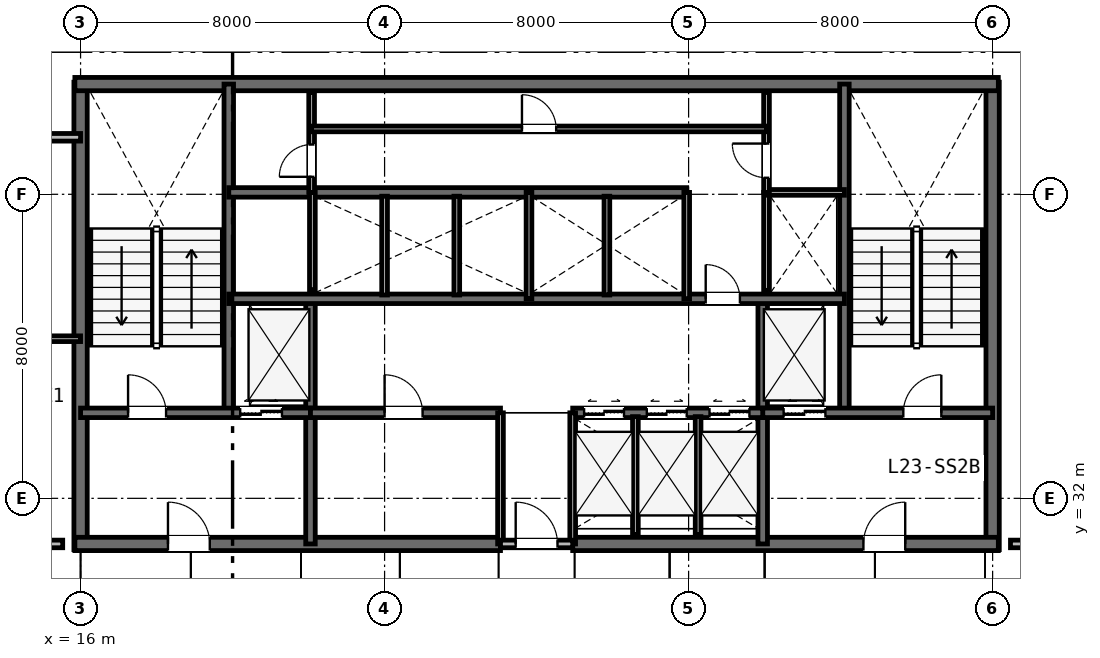
"""IFC4 building model, lengths in metres.
Left out: names, types, materials, properties, quantities, classifications, styles, units other than length and angle.
Written with IfcOpenShell. Run it as: python <this file> out.ifc"""

import sys

from ifc_helpers import new_model, si_unit, direction, frame, frame_2d, origin, place, context, subcontext, project, spatial, rectangle, extrude, element, fill, save


model = new_model("IFC4")
c1 = context("Model", 3, precision=1e-05, world=origin(), true_north=direction((0.0, 1.0)))
c2 = subcontext(c1, "Body", "Model", "MODEL_VIEW")
j1 = project(units=[si_unit("LENGTHUNIT", "METRE"), si_unit("PLANEANGLEUNIT", "RADIAN")], contexts=[c1])
p1 = place(None, origin())
s1 = spatial("IfcSite", under=j1, at=p1, CompositionType="ELEMENT")
p2 = place(p1, origin())
s2 = spatial("IfcBuilding", under=s1, at=p2, CompositionType="ELEMENT")
p3 = place(p2, frame((0.0, 0.0, 93.6)))
s3 = spatial("IfcBuildingStorey", under=s2, at=p3, CompositionType="ELEMENT", Elevation=93.6)
for number, where, z_axis, x_axis in (
    (1, (16.0, 30.65, 0.0), (0.0, 0.0, 1.0), (0.0, 1.0, 0.0)),
    (2, (40.0, 30.65, 0.0), (0.0, 0.0, 1.0), (0.0, 1.0, 0.0)),
):
    element("IfcWall", number, at=place(p3, frame(where, z_axis=z_axis, x_axis=x_axis)), inside=s3, PredefinedType="SHEAR", context=c2, shape_type="SweptSolid", body=[
        extrude(rectangle(XDim=12.3, YDim=0.35, at=frame_2d((6.15, 0.0))), origin(), (0.0, 0.0, 1.0), 3.6),
    ])
p4 = place(p3, frame((15.85, 42.9, 0.0), z_axis=(0.0, 0.0, 1.0), x_axis=(1.0, 0.0, 0.0)))
e3 = element("IfcWall", 3, at=p4, inside=s3, PredefinedType="SHEAR", context=c2, shape_type="SweptSolid", body=[
    extrude(rectangle(XDim=24.3, YDim=0.35, at=frame_2d((12.15, 0.0))), origin(), (0.0, 0.0, 1.0), 3.6),
])
p5 = place(p3, frame((15.85, 30.8, 0.0), z_axis=(0.0, 0.0, 1.0), x_axis=(1.0, 0.0, 0.0)))
e4 = element("IfcWall", 4, at=p5, inside=s3, PredefinedType="SHEAR", context=c2, shape_type="SweptSolid", body=[
    extrude(rectangle(XDim=11.2, YDim=0.35, at=frame_2d((5.6, 0.0))), origin(), (0.0, 0.0, 1.0), 3.6),
])
p6 = place(p5, frame((2.45, 0.0, 0.0)))
e5 = element("IfcOpeningElement", 5, at=p6, cuts=e4, PredefinedType="OPENING", context=c2, shape_type="SweptSolid", body=[
    extrude(rectangle(XDim=1.1, YDim=2.15, at=frame_2d((0.55, 1.075))), frame((0.0, 0.185, 0.0), z_axis=(0.0, -1.0, 0.0), x_axis=(1.0, 0.0, 0.0)), (0.0, 0.0, 1.0), 0.37),
])
p7 = place(p3, frame((28.95, 30.8, 0.0), z_axis=(0.0, 0.0, 1.0), x_axis=(1.0, 0.0, 0.0)))
e6 = element("IfcWall", 6, at=p7, inside=s3, PredefinedType="SHEAR", context=c2, shape_type="SweptSolid", body=[
    extrude(rectangle(XDim=11.2, YDim=0.35, at=frame_2d((5.6, 0.0))), origin(), (0.0, 0.0, 1.0), 3.6),
])
p8 = place(p7, frame((7.65, 0.0, 0.0)))
e7 = element("IfcOpeningElement", 7, at=p8, cuts=e6, PredefinedType="OPENING", context=c2, shape_type="SweptSolid", body=[
    extrude(rectangle(XDim=1.1, YDim=2.15, at=frame_2d((0.55, 1.075))), frame((0.0, 0.185, 0.0), z_axis=(0.0, -1.0, 0.0), x_axis=(1.0, 0.0, 0.0)), (0.0, 0.0, 1.0), 0.37),
])
for number, where, z_axis, x_axis in (
    (8, (19.9, 34.25, 0.0), (0.0, 0.0, 1.0), (0.0, 1.0, 0.0)),
    (9, (36.1, 34.25, 0.0), (0.0, 0.0, 1.0), (0.0, 1.0, 0.0)),
):
    element("IfcWall", number, at=place(p3, frame(where, z_axis=z_axis, x_axis=x_axis)), inside=s3, PredefinedType="SHEAR", context=c2, shape_type="SweptSolid", body=[
        extrude(rectangle(XDim=8.65, YDim=0.25, at=frame_2d((4.325, 0.0))), origin(), (0.0, 0.0, 1.0), 3.6),
    ])
for number, where, z_axis, x_axis in (
    (10, (22.05, 30.8, 0.0), (0.0, 0.0, 1.0), (0.0, 1.0, 0.0)),
    (11, (33.95, 30.8, 0.0), (0.0, 0.0, 1.0), (0.0, 1.0, 0.0)),
):
    element("IfcWall", number, at=place(p3, frame(where, z_axis=z_axis, x_axis=x_axis)), inside=s3, PredefinedType="SHEAR", context=c2, shape_type="SweptSolid", body=[
        extrude(rectangle(XDim=6.45, YDim=0.25, at=frame_2d((3.225, 0.0))), origin(), (0.0, 0.0, 1.0), 3.6),
    ])
p9 = place(p3, frame((16.0, 34.25, 0.0), z_axis=(0.0, 0.0, 1.0), x_axis=(1.0, 0.0, 0.0)))
e12 = element("IfcWall", 12, at=p9, inside=s3, PredefinedType="SHEAR", context=c2, shape_type="SweptSolid", body=[
    extrude(rectangle(XDim=6.05, YDim=0.25, at=frame_2d((3.025, 0.0))), origin(), (0.0, 0.0, 1.0), 3.6),
])
p10 = place(p9, frame((1.25, 0.0, 0.0)))
e13 = element("IfcOpeningElement", 13, at=p10, cuts=e12, PredefinedType="OPENING", context=c2, shape_type="SweptSolid", body=[
    extrude(rectangle(XDim=1.0, YDim=2.15, at=frame_2d((0.5, 1.075))), frame((0.0, 0.135, 0.0), z_axis=(0.0, -1.0, 0.0), x_axis=(1.0, 0.0, 0.0)), (0.0, 0.0, 1.0), 0.27),
])
p11 = place(p9, frame((4.2, 0.0, 0.0)))
e14 = element("IfcOpeningElement", 14, at=p11, cuts=e12, PredefinedType="OPENING", context=c2, shape_type="SweptSolid", body=[
    extrude(rectangle(XDim=1.1, YDim=2.15, at=frame_2d((0.55, 1.075))), frame((0.0, 0.135, 0.0), z_axis=(0.0, -1.0, 0.0), x_axis=(1.0, 0.0, 0.0)), (0.0, 0.0, 1.0), 0.27),
])
p12 = place(p3, frame((33.95, 34.25, 0.0), z_axis=(0.0, 0.0, 1.0), x_axis=(1.0, 0.0, 0.0)))
e15 = element("IfcWall", 15, at=p12, inside=s3, PredefinedType="SHEAR", context=c2, shape_type="SweptSolid", body=[
    extrude(rectangle(XDim=6.05, YDim=0.25, at=frame_2d((3.025, 0.0))), origin(), (0.0, 0.0, 1.0), 3.6),
])
p13 = place(p12, frame((3.7, 0.0, 0.0)))
e16 = element("IfcOpeningElement", 16, at=p13, cuts=e15, PredefinedType="OPENING", context=c2, shape_type="SweptSolid", body=[
    extrude(rectangle(XDim=1.0, YDim=2.15, at=frame_2d((0.5, 1.075))), frame((0.0, 0.135, 0.0), z_axis=(0.0, -1.0, 0.0), x_axis=(1.0, 0.0, 0.0)), (0.0, 0.0, 1.0), 0.27),
])
p14 = place(p12, frame((0.55, 0.0, 0.0)))
e17 = element("IfcOpeningElement", 17, at=p14, cuts=e15, PredefinedType="OPENING", context=c2, shape_type="SweptSolid", body=[
    extrude(rectangle(XDim=1.1, YDim=2.15, at=frame_2d((0.55, 1.075))), frame((0.0, 0.135, 0.0), z_axis=(0.0, -1.0, 0.0), x_axis=(1.0, 0.0, 0.0)), (0.0, 0.0, 1.0), 0.27),
])
p15 = place(p3, frame((22.05, 34.25, 0.0), z_axis=(0.0, 0.0, 1.0), x_axis=(1.0, 0.0, 0.0)))
e18 = element("IfcWall", 18, at=p15, inside=s3, PredefinedType="SHEAR", context=c2, shape_type="SweptSolid", body=[
    extrude(rectangle(XDim=5.0, YDim=0.25, at=frame_2d((2.5, 0.0))), origin(), (0.0, 0.0, 1.0), 3.6),
])
p16 = place(p15, frame((1.95, 0.0, 0.0)))
e19 = element("IfcOpeningElement", 19, at=p16, cuts=e18, PredefinedType="OPENING", context=c2, shape_type="SweptSolid", body=[
    extrude(rectangle(XDim=1.0, YDim=2.15, at=frame_2d((0.5, 1.075))), frame((0.0, 0.135, 0.0), z_axis=(0.0, -1.0, 0.0), x_axis=(1.0, 0.0, 0.0)), (0.0, 0.0, 1.0), 0.27),
])
p17 = place(p3, frame((28.95, 34.25, 0.0), z_axis=(0.0, 0.0, 1.0), x_axis=(1.0, 0.0, 0.0)))
e20 = element("IfcWall", 20, at=p17, inside=s3, PredefinedType="SHEAR", context=c2, shape_type="SweptSolid", body=[
    extrude(rectangle(XDim=5.0, YDim=0.25, at=frame_2d((2.5, 0.0))), origin(), (0.0, 0.0, 1.0), 3.6),
])
p18 = place(p17, frame((0.3, 0.0, 0.0)))
e21 = element("IfcOpeningElement", 21, at=p18, cuts=e20, PredefinedType="OPENING", context=c2, shape_type="SweptSolid", body=[
    extrude(rectangle(XDim=1.05, YDim=2.15, at=frame_2d((0.525, 1.075))), frame((0.0, 0.135, 0.0), z_axis=(0.0, -1.0, 0.0), x_axis=(1.0, 0.0, 0.0)), (0.0, 0.0, 1.0), 0.27),
])
p19 = place(p17, frame((1.95, 0.0, 0.0)))
e22 = element("IfcOpeningElement", 22, at=p19, cuts=e20, PredefinedType="OPENING", context=c2, shape_type="SweptSolid", body=[
    extrude(rectangle(XDim=1.05, YDim=2.15, at=frame_2d((0.525, 1.075))), frame((0.0, 0.135, 0.0), z_axis=(0.0, -1.0, 0.0), x_axis=(1.0, 0.0, 0.0)), (0.0, 0.0, 1.0), 0.27),
])
p20 = place(p17, frame((3.6, 0.0, 0.0)))
e23 = element("IfcOpeningElement", 23, at=p20, cuts=e20, PredefinedType="OPENING", context=c2, shape_type="SweptSolid", body=[
    extrude(rectangle(XDim=1.05, YDim=2.15, at=frame_2d((0.525, 1.075))), frame((0.0, 0.135, 0.0), z_axis=(0.0, -1.0, 0.0), x_axis=(1.0, 0.0, 0.0)), (0.0, 0.0, 1.0), 0.27),
])
p21 = place(p3, frame((19.9, 37.25, 0.0), z_axis=(0.0, 0.0, 1.0), x_axis=(1.0, 0.0, 0.0)))
e24 = element("IfcWall", 24, at=p21, inside=s3, PredefinedType="SHEAR", context=c2, shape_type="SweptSolid", body=[
    extrude(rectangle(XDim=16.2, YDim=0.25, at=frame_2d((8.1, 0.0))), origin(), (0.0, 0.0, 1.0), 3.6),
])
p22 = place(p21, frame((12.55, 0.0, 0.0)))
e25 = element("IfcOpeningElement", 25, at=p22, cuts=e24, PredefinedType="OPENING", context=c2, shape_type="SweptSolid", body=[
    extrude(rectangle(XDim=0.9, YDim=2.15, at=frame_2d((0.45, 1.075))), frame((0.0, 0.135, 0.0), z_axis=(0.0, -1.0, 0.0), x_axis=(1.0, 0.0, 0.0)), (0.0, 0.0, 1.0), 0.27),
])
p23 = place(p3, frame((19.9, 40.05, 0.0), z_axis=(0.0, 0.0, 1.0), x_axis=(1.0, 0.0, 0.0)))
e26 = element("IfcWall", 26, at=p23, inside=s3, PredefinedType="SHEAR", context=c2, shape_type="SweptSolid", body=[
    extrude(rectangle(XDim=12.05, YDim=0.25, at=frame_2d((6.025, 0.0))), origin(), (0.0, 0.0, 1.0), 3.6),
])
p24 = place(p3, frame((27.05, 30.8, 0.0), z_axis=(0.0, 0.0, 1.0), x_axis=(0.0, 1.0, 0.0)))
e27 = element("IfcWall", 27, at=p24, inside=s3, PredefinedType="PLUMBINGWALL", context=c2, shape_type="SweptSolid", body=[
    extrude(rectangle(XDim=3.45, YDim=0.15, at=frame_2d((1.725, 0.0))), origin(), (0.0, 0.0, 1.0), 3.02),
])
p25 = place(p3, frame((28.95, 30.8, 0.0), z_axis=(0.0, 0.0, 1.0), x_axis=(0.0, 1.0, 0.0)))
e28 = element("IfcWall", 28, at=p25, inside=s3, PredefinedType="PLUMBINGWALL", context=c2, shape_type="SweptSolid", body=[
    extrude(rectangle(XDim=3.45, YDim=0.15, at=frame_2d((1.725, 0.0))), origin(), (0.0, 0.0, 1.0), 3.33),
])
p26 = place(p3, frame((27.05, 30.8, 0.0), z_axis=(0.0, 0.0, 1.0), x_axis=(1.0, 0.0, 0.0)))
e29 = element("IfcWall", 29, at=p26, inside=s3, PredefinedType="PARTITIONING", context=c2, shape_type="SweptSolid", body=[
    extrude(rectangle(XDim=1.9, YDim=0.2, at=frame_2d((0.95, 0.0))), origin(), (0.0, 0.0, 1.0), 3.02),
])
p27 = place(p26, frame((0.4, 0.0, 0.0)))
e30 = element("IfcOpeningElement", 30, at=p27, cuts=e29, PredefinedType="OPENING", context=c2, shape_type="SweptSolid", body=[
    extrude(rectangle(XDim=1.1, YDim=2.15, at=frame_2d((0.55, 1.075))), frame((0.0, 0.11, 0.0), z_axis=(0.0, -1.0, 0.0), x_axis=(1.0, 0.0, 0.0)), (0.0, 0.0, 1.0), 0.22),
])
for number, where, z_axis, x_axis in (
    (31, (30.6, 31.05, 0.0), (0.0, 0.0, 1.0), (0.0, 1.0, 0.0)),
    (32, (32.25, 31.05, 0.0), (0.0, 0.0, 1.0), (0.0, 1.0, 0.0)),
):
    element("IfcWall", number, at=place(p3, frame(where, z_axis=z_axis, x_axis=x_axis)), inside=s3, PredefinedType="PLUMBINGWALL", context=c2, shape_type="SweptSolid", body=[
        extrude(rectangle(XDim=3.1, YDim=0.15, at=frame_2d((1.55, 0.0))), origin(), (0.0, 0.0, 1.0), 3.33),
    ])
p28 = place(p3, frame((22.1, 37.49, 0.0), z_axis=(0.0, 0.0, 1.0), x_axis=(0.0, 1.0, 0.0)))
e33 = element("IfcWall", 33, at=p28, inside=s3, PredefinedType="PLUMBINGWALL", context=c2, shape_type="SweptSolid", body=[
    extrude(rectangle(XDim=2.56, YDim=0.15, at=frame_2d((1.28, 0.0))), origin(), (0.0, 0.0, 1.0), 3.33),
])
p29 = place(p3, frame((27.8, 37.25, 0.0), z_axis=(0.0, 0.0, 1.0), x_axis=(0.0, 1.0, 0.0)))
e34 = element("IfcWall", 34, at=p29, inside=s3, PredefinedType="PLUMBINGWALL", context=c2, shape_type="SweptSolid", body=[
    extrude(rectangle(XDim=2.8, YDim=0.15, at=frame_2d((1.4, 0.0))), origin(), (0.0, 0.0, 1.0), 3.33),
])
for number, where, z_axis, x_axis in (
    (35, (24.0, 37.35, 0.0), (0.0, 0.0, 1.0), (0.0, 1.0, 0.0)),
    (36, (25.9, 37.35, 0.0), (0.0, 0.0, 1.0), (0.0, 1.0, 0.0)),
):
    element("IfcWall", number, at=place(p3, frame(where, z_axis=z_axis, x_axis=x_axis)), inside=s3, PredefinedType="PLUMBINGWALL", context=c2, shape_type="SweptSolid", body=[
        extrude(rectangle(XDim=2.6, YDim=0.15, at=frame_2d((1.3, 0.0))), origin(), (0.0, 0.0, 1.0), 3.33),
    ])
p30 = place(p3, frame((31.95, 37.25, 0.0), z_axis=(0.0, 0.0, 1.0), x_axis=(0.0, 1.0, 0.0)))
e37 = element("IfcWall", 37, at=p30, inside=s3, PredefinedType="PLUMBINGWALL", context=c2, shape_type="SweptSolid", body=[
    extrude(rectangle(XDim=2.8, YDim=0.15, at=frame_2d((1.4, 0.0))), origin(), (0.0, 0.0, 1.0), 3.33),
])
p31 = place(p3, frame((29.85, 37.35, 0.0), z_axis=(0.0, 0.0, 1.0), x_axis=(0.0, 1.0, 0.0)))
e38 = element("IfcWall", 38, at=p31, inside=s3, PredefinedType="PLUMBINGWALL", context=c2, shape_type="SweptSolid", body=[
    extrude(rectangle(XDim=2.6, YDim=0.15, at=frame_2d((1.3, 0.0))), origin(), (0.0, 0.0, 1.0), 3.33),
])
p32 = place(p3, frame((34.05, 37.473, 0.0), z_axis=(0.0, 0.0, 1.0), x_axis=(0.0, 1.0, 0.0)))
e39 = element("IfcWall", 39, at=p32, inside=s3, PredefinedType="PLUMBINGWALL", context=c2, shape_type="SweptSolid", body=[
    extrude(rectangle(XDim=2.577, YDim=0.15, at=frame_2d((1.288, 0.0))), origin(), (0.0, 0.0, 1.0), 3.33),
])
p33 = place(p3, frame((34.05, 40.05, 0.0), z_axis=(0.0, 0.0, 1.0), x_axis=(1.0, 0.0, 0.0)))
e40 = element("IfcWall", 40, at=p33, inside=s3, PredefinedType="PARTITIONING", context=c2, shape_type="SweptSolid", body=[
    extrude(rectangle(XDim=2.05, YDim=0.15, at=frame_2d((1.025, 0.0))), origin(), (0.0, 0.0, 1.0), 3.33),
])
p34 = place(p3, frame((34.05, 40.05, 0.0), z_axis=(0.0, 0.0, 1.0), x_axis=(0.0, 1.0, 0.0)))
e41 = element("IfcWall", 41, at=p34, inside=s3, PredefinedType="PARTITIONING", context=c2, shape_type="SweptSolid", body=[
    extrude(rectangle(XDim=2.63, YDim=0.15, at=frame_2d((1.315, 0.0))), origin(), (0.0, 0.0, 1.0), 3.33),
])
p35 = place(p34, frame((0.385, 0.0, 0.0)))
e42 = element("IfcOpeningElement", 42, at=p35, cuts=e41, PredefinedType="OPENING", context=c2, shape_type="SweptSolid", body=[
    extrude(rectangle(XDim=0.9, YDim=2.15, at=frame_2d((0.45, 1.075))), frame((0.0, 0.085, 0.0), z_axis=(0.0, -1.0, 0.0), x_axis=(1.0, 0.0, 0.0)), (0.0, 0.0, 1.0), 0.17),
])
p36 = place(p3, frame((22.08, 40.05, 0.0), z_axis=(0.0, 0.0, 1.0), x_axis=(0.0, 1.0, 0.0)))
e43 = element("IfcWall", 43, at=p36, inside=s3, PredefinedType="PARTITIONING", context=c2, shape_type="SweptSolid", body=[
    extrude(rectangle(XDim=2.63, YDim=0.15, at=frame_2d((1.315, 0.0))), origin(), (0.0, 0.0, 1.0), 3.33),
])
p37 = place(p36, frame((0.41, 0.0, 0.0)))
e44 = element("IfcOpeningElement", 44, at=p37, cuts=e43, PredefinedType="OPENING", context=c2, shape_type="SweptSolid", body=[
    extrude(rectangle(XDim=0.85, YDim=2.15, at=frame_2d((0.425, 1.075))), frame((0.0, 0.085, 0.0), z_axis=(0.0, -1.0, 0.0), x_axis=(1.0, 0.0, 0.0)), (0.0, 0.0, 1.0), 0.17),
])
p38 = place(p3, frame((22.08, 41.72, 0.0), z_axis=(0.0, 0.0, 1.0), x_axis=(1.0, 0.0, 0.0)))
e45 = element("IfcWall", 45, at=p38, inside=s3, PredefinedType="PARTITIONING", context=c2, shape_type="SweptSolid", body=[
    extrude(rectangle(XDim=11.97, YDim=0.15, at=frame_2d((5.985, 0.0))), origin(), (0.0, 0.0, 1.0), 3.33),
])
p39 = place(p38, frame((5.535, 0.0, 0.0)))
e46 = element("IfcOpeningElement", 46, at=p39, cuts=e45, PredefinedType="OPENING", context=c2, shape_type="SweptSolid", body=[
    extrude(rectangle(XDim=0.9, YDim=2.15, at=frame_2d((0.45, 1.075))), frame((0.0, 0.085, 0.0), z_axis=(0.0, -1.0, 0.0), x_axis=(1.0, 0.0, 0.0)), (0.0, 0.0, 1.0), 0.17),
])
p40 = place(p3, frame((11.4, 30.8, 0.0), z_axis=(0.0, 0.0, 1.0), x_axis=(1.0, 0.0, 0.0)))
e47 = element("IfcWall", 47, at=p40, inside=s3, PredefinedType="PARTITIONING", context=c2, shape_type="SweptSolid", body=[
    extrude(rectangle(XDim=4.13, YDim=0.2, at=frame_2d((2.065, 0.0))), origin(), (0.0, 0.0, 1.0), 2.83),
])
p41 = place(p3, frame((40.47, 30.8, 0.0), z_axis=(0.0, 0.0, 1.0), x_axis=(1.0, 0.0, 0.0)))
e48 = element("IfcWall", 48, at=p41, inside=s3, PredefinedType="PARTITIONING", context=c2, shape_type="SweptSolid", body=[
    extrude(rectangle(XDim=1.73, YDim=0.2, at=frame_2d((0.865, 0.0))), origin(), (0.0, 0.0, 1.0), 2.83),
])
p42 = place(p3, frame((0.1, 41.5, 0.0), z_axis=(0.0, 0.0, 1.0), x_axis=(1.0, 0.0, 0.0)))
e49 = element("IfcWall", 49, at=p42, inside=s3, PredefinedType="PARTITIONING", context=c2, shape_type="SweptSolid", body=[
    extrude(rectangle(XDim=15.9, YDim=0.2, at=frame_2d((7.95, 0.0))), origin(), (0.0, 0.0, 1.0), 2.83),
])
p43 = place(p42, frame((9.877, 0.0, 0.0)))
e50 = element("IfcOpeningElement", 50, at=p43, cuts=e49, PredefinedType="OPENING", context=c2, shape_type="SweptSolid", body=[
    extrude(rectangle(XDim=0.95, YDim=2.15, at=frame_2d((0.475, 1.075))), frame((0.0, 0.11, 0.0), z_axis=(0.0, -1.0, 0.0), x_axis=(1.0, 0.0, 0.0)), (0.0, 0.0, 1.0), 0.22),
])
p44 = place(p3, frame((11.4, 36.2, 0.0), z_axis=(0.0, 0.0, 1.0), x_axis=(1.0, 0.0, 0.0)))
e51 = element("IfcWall", 51, at=p44, inside=s3, PredefinedType="PARTITIONING", context=c2, shape_type="SweptSolid", body=[
    extrude(rectangle(XDim=4.6, YDim=0.15, at=frame_2d((2.3, 0.0))), origin(), (0.0, 0.0, 1.0), 3.33),
])
p45 = place(p27, origin())
e52 = element("IfcDoor", 52, at=p45, inside=s3, OperationType="SINGLE_SWING_LEFT", PredefinedType="DOOR", context=c2, shape_type="SweptSolid", body=[
    extrude(rectangle(XDim=1.1, YDim=2.15, at=frame_2d((0.55, 1.075))), frame((0.0, 0.025, 0.0), z_axis=(0.0, -1.0, 0.0), x_axis=(1.0, 0.0, 0.0)), (0.0, 0.0, 1.0), 0.05),
])
fill(e30, e52)
p46 = place(p10, origin())
e53 = element("IfcDoor", 53, at=p46, inside=s3, OperationType="SINGLE_SWING_LEFT", PredefinedType="DOOR", context=c2, shape_type="SweptSolid", body=[
    extrude(rectangle(XDim=1.0, YDim=2.15, at=frame_2d((0.5, 1.075))), frame((0.0, 0.025, 0.0), z_axis=(0.0, -1.0, 0.0), x_axis=(1.0, 0.0, 0.0)), (0.0, 0.0, 1.0), 0.05),
])
fill(e13, e53)
p47 = place(p13, origin())
e54 = element("IfcDoor", 54, at=p47, inside=s3, OperationType="SINGLE_SWING_RIGHT", PredefinedType="DOOR", context=c2, shape_type="SweptSolid", body=[
    extrude(rectangle(XDim=1.0, YDim=2.15, at=frame_2d((0.5, 1.075))), frame((0.0, 0.025, 0.0), z_axis=(0.0, -1.0, 0.0), x_axis=(1.0, 0.0, 0.0)), (0.0, 0.0, 1.0), 0.05),
])
fill(e16, e54)
p48 = place(p6, origin())
e55 = element("IfcDoor", 55, at=p48, inside=s3, OperationType="SINGLE_SWING_LEFT", PredefinedType="DOOR", context=c2, shape_type="SweptSolid", body=[
    extrude(rectangle(XDim=1.1, YDim=2.15, at=frame_2d((0.55, 1.075))), frame((0.0, 0.025, 0.0), z_axis=(0.0, -1.0, 0.0), x_axis=(1.0, 0.0, 0.0)), (0.0, 0.0, 1.0), 0.05),
])
fill(e5, e55)
p49 = place(p8, origin())
e56 = element("IfcDoor", 56, at=p49, inside=s3, OperationType="SINGLE_SWING_RIGHT", PredefinedType="DOOR", context=c2, shape_type="SweptSolid", body=[
    extrude(rectangle(XDim=1.1, YDim=2.15, at=frame_2d((0.55, 1.075))), frame((0.0, 0.025, 0.0), z_axis=(0.0, -1.0, 0.0), x_axis=(1.0, 0.0, 0.0)), (0.0, 0.0, 1.0), 0.05),
])
fill(e7, e56)
p50 = place(p16, origin())
e57 = element("IfcDoor", 57, at=p50, inside=s3, OperationType="SINGLE_SWING_LEFT", PredefinedType="DOOR", context=c2, shape_type="SweptSolid", body=[
    extrude(rectangle(XDim=1.0, YDim=2.15, at=frame_2d((0.5, 1.075))), frame((0.0, 0.025, 0.0), z_axis=(0.0, -1.0, 0.0), x_axis=(1.0, 0.0, 0.0)), (0.0, 0.0, 1.0), 0.05),
])
fill(e19, e57)
p51 = place(p22, origin())
e58 = element("IfcDoor", 58, at=p51, inside=s3, OperationType="SINGLE_SWING_LEFT", PredefinedType="DOOR", context=c2, shape_type="SweptSolid", body=[
    extrude(rectangle(XDim=0.9, YDim=2.15, at=frame_2d((0.45, 1.075))), frame((0.0, 0.025, 0.0), z_axis=(0.0, -1.0, 0.0), x_axis=(1.0, 0.0, 0.0)), (0.0, 0.0, 1.0), 0.05),
])
fill(e25, e58)
p52 = place(p35, origin())
e59 = element("IfcDoor", 59, at=p52, inside=s3, OperationType="SINGLE_SWING_RIGHT", PredefinedType="DOOR", context=c2, shape_type="SweptSolid", body=[
    extrude(rectangle(XDim=0.9, YDim=2.15, at=frame_2d((0.45, 1.075))), frame((0.0, 0.025, 0.0), z_axis=(0.0, -1.0, 0.0), x_axis=(1.0, 0.0, 0.0)), (0.0, 0.0, 1.0), 0.05),
])
fill(e42, e59)
p53 = place(p37, origin())
e60 = element("IfcDoor", 60, at=p53, inside=s3, OperationType="SINGLE_SWING_LEFT", PredefinedType="DOOR", context=c2, shape_type="SweptSolid", body=[
    extrude(rectangle(XDim=0.85, YDim=2.15, at=frame_2d((0.425, 1.075))), frame((0.0, 0.025, 0.0), z_axis=(0.0, -1.0, 0.0), x_axis=(1.0, 0.0, 0.0)), (0.0, 0.0, 1.0), 0.05),
])
fill(e44, e60)
p54 = place(p39, origin())
e61 = element("IfcDoor", 61, at=p54, inside=s3, OperationType="SINGLE_SWING_LEFT", PredefinedType="DOOR", context=c2, shape_type="SweptSolid", body=[
    extrude(rectangle(XDim=0.9, YDim=2.15, at=frame_2d((0.45, 1.075))), frame((0.0, 0.025, 0.0), z_axis=(0.0, -1.0, 0.0), x_axis=(1.0, 0.0, 0.0)), (0.0, 0.0, 1.0), 0.05),
])
fill(e46, e61)
p55 = place(p11, origin())
e62 = element("IfcDoor", 62, at=p55, inside=s3, OperationType="DOUBLE_DOOR_SLIDING", PredefinedType="DOOR", context=c2, shape_type="SweptSolid", body=[
    extrude(rectangle(XDim=1.1, YDim=2.15, at=frame_2d((0.55, 1.075))), frame((0.0, 0.025, 0.0), z_axis=(0.0, -1.0, 0.0), x_axis=(1.0, 0.0, 0.0)), (0.0, 0.0, 1.0), 0.05),
])
fill(e14, e62)
p56 = place(p14, origin())
e63 = element("IfcDoor", 63, at=p56, inside=s3, OperationType="DOUBLE_DOOR_SLIDING", PredefinedType="DOOR", context=c2, shape_type="SweptSolid", body=[
    extrude(rectangle(XDim=1.1, YDim=2.15, at=frame_2d((0.55, 1.075))), frame((0.0, 0.025, 0.0), z_axis=(0.0, -1.0, 0.0), x_axis=(1.0, 0.0, 0.0)), (0.0, 0.0, 1.0), 0.05),
])
fill(e17, e63)
p57 = place(p18, origin())
e64 = element("IfcDoor", 64, at=p57, inside=s3, OperationType="DOUBLE_DOOR_SLIDING", PredefinedType="DOOR", context=c2, shape_type="SweptSolid", body=[
    extrude(rectangle(XDim=1.05, YDim=2.15, at=frame_2d((0.525, 1.075))), frame((0.0, 0.025, 0.0), z_axis=(0.0, -1.0, 0.0), x_axis=(1.0, 0.0, 0.0)), (0.0, 0.0, 1.0), 0.05),
])
fill(e21, e64)
p58 = place(p19, origin())
e65 = element("IfcDoor", 65, at=p58, inside=s3, OperationType="DOUBLE_DOOR_SLIDING", PredefinedType="DOOR", context=c2, shape_type="SweptSolid", body=[
    extrude(rectangle(XDim=1.05, YDim=2.15, at=frame_2d((0.525, 1.075))), frame((0.0, 0.025, 0.0), z_axis=(0.0, -1.0, 0.0), x_axis=(1.0, 0.0, 0.0)), (0.0, 0.0, 1.0), 0.05),
])
fill(e22, e65)
p59 = place(p20, origin())
e66 = element("IfcDoor", 66, at=p59, inside=s3, OperationType="DOUBLE_DOOR_SLIDING", PredefinedType="DOOR", context=c2, shape_type="SweptSolid", body=[
    extrude(rectangle(XDim=1.05, YDim=2.15, at=frame_2d((0.525, 1.075))), frame((0.0, 0.025, 0.0), z_axis=(0.0, -1.0, 0.0), x_axis=(1.0, 0.0, 0.0)), (0.0, 0.0, 1.0), 0.05),
])
fill(e23, e66)
save(model, sys.argv[1])
